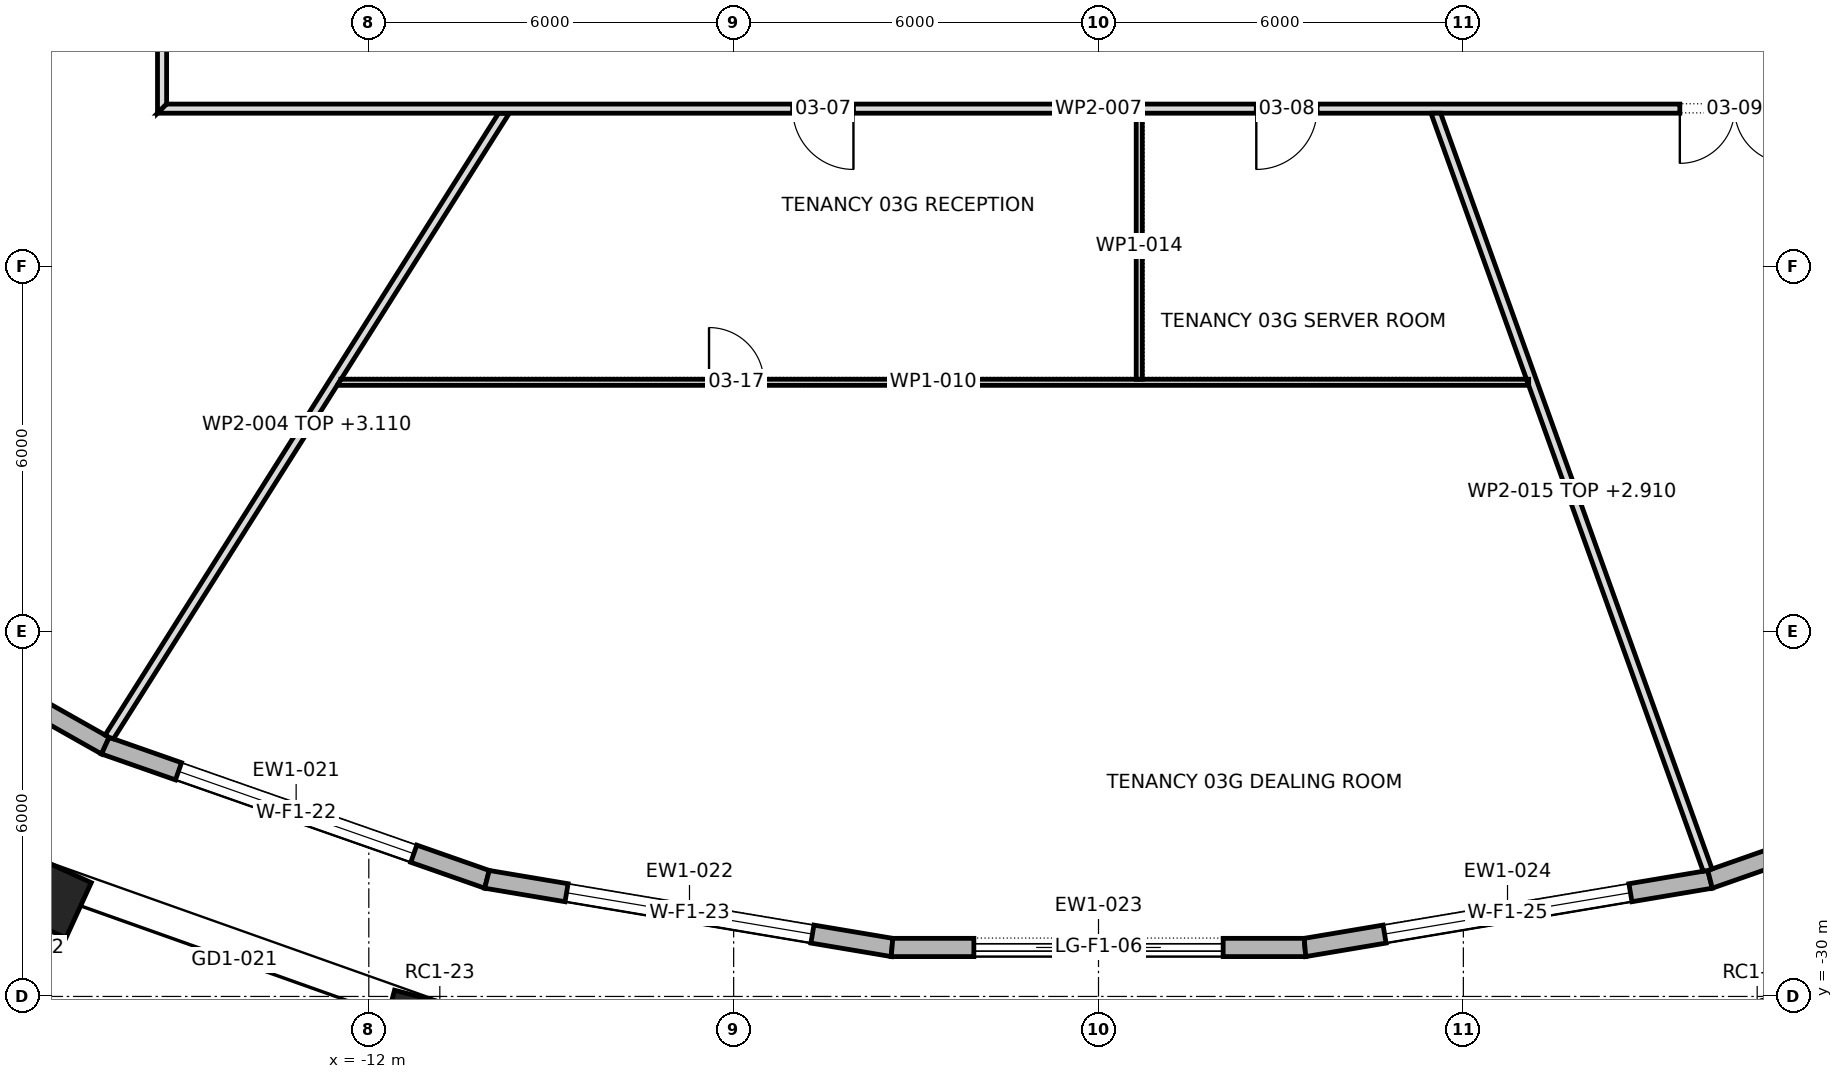
"""IFC4 building model, lengths in metres.
Left out: names, types, materials, properties, quantities, classifications, styles, units other than length and angle.
Written with IfcOpenShell. Run it as: python <this file> out.ifc"""

import sys

from ifc_helpers import new_model, si_unit, direction, frame, frame_2d, origin, origin_2d, place, context, subcontext, project, spatial, polyline, rectangle, outline, extrude, element, fill, save


model = new_model("IFC4")
c1 = context("Model", 3, precision=1e-05, world=origin(), true_north=direction((0.0, 1.0)))
c2 = subcontext(c1, "Body", "Model", "MODEL_VIEW")
j1 = project(units=[si_unit("LENGTHUNIT", "METRE"), si_unit("PLANEANGLEUNIT", "RADIAN")], contexts=[c1])
p1 = place(None, origin())
s1 = spatial("IfcSite", under=j1, at=p1, CompositionType="ELEMENT")
p2 = place(p1, origin())
s2 = spatial("IfcBuilding", under=s1, at=p2, CompositionType="ELEMENT")
p3 = place(p2, frame((0.0, 0.0, 48.7)))
s3 = spatial("IfcBuildingStorey", under=s2, at=p3, CompositionType="ELEMENT", Elevation=48.7)
for number, where, z_axis, x_axis in (
    (1, (-17.591, -28.208, 0.0), (0.0, 0.0, 1.0), (0.909, -0.417, 0.0)),
    (2, (-10.832, -30.608, 0.0), (0.0, 0.0, 1.0), (0.968, -0.252, 0.0)),
    (3, (10.832, -30.608, 0.0), (0.0, 0.0, 1.0), (0.968, 0.252, 0.0)),
):
    element("IfcColumn", number, at=place(p3, frame(where, z_axis=z_axis, x_axis=x_axis)), inside=s3, PredefinedType="COLUMN", context=c2, shape_type="SweptSolid", body=[
        extrude(rectangle(XDim=1.8, YDim=1.0, at=origin_2d()), origin(), (0.0, 0.0, 1.0), 4.2),
    ])
p4 = place(p3, frame((-21.983, -22.684, 0.0), z_axis=(0.0, 0.0, 1.0), x_axis=(0.870647609977, -0.491907246584, 0.0)))
e4 = element("IfcWall", 4, at=p4, inside=s3, PredefinedType="STANDARD", context=c2, shape_type="SweptSolid", body=[
    extrude(outline(polyline([(-0.014, -0.15), (6.503, -0.15), (6.476, 0.15), (0.014, 0.15), (-0.014, -0.15)])), origin(), (0.0, 0.0, 1.0), 3.9),
])
p5 = place(p4, frame((1.195, 0.0, 0.6)))
e5 = element("IfcOpeningElement", 5, at=p5, cuts=e4, PredefinedType="OPENING", context=c2, shape_type="SweptSolid", body=[
    extrude(rectangle(XDim=4.1, YDim=2.85, at=frame_2d((2.05, 1.425))), frame((0.0, 0.162, 0.0), z_axis=(0.0, -1.0, 0.0), x_axis=(1.0, 0.0, 0.0)), (0.0, 0.0, 1.0), 0.324),
])
p6 = place(p3, frame((-16.333, -25.876, 0.0), z_axis=(0.0, 0.0, 1.0), x_axis=(0.943790794479, -0.330543395421, 0.0)))
e6 = element("IfcWall", 6, at=p6, inside=s3, PredefinedType="STANDARD", context=c2, shape_type="SweptSolid", body=[
    extrude(outline(polyline([(-0.013, -0.15), (6.662, -0.15), (6.637, 0.15), (0.013, 0.15), (-0.013, -0.15)])), origin(), (0.0, 0.0, 1.0), 3.9),
])
p7 = place(p6, frame((1.275, 0.0, 0.6)))
e7 = element("IfcOpeningElement", 7, at=p7, cuts=e6, PredefinedType="OPENING", context=c2, shape_type="SweptSolid", body=[
    extrude(rectangle(XDim=4.1, YDim=2.85, at=frame_2d((2.05, 1.425))), frame((0.0, 0.162, 0.0), z_axis=(0.0, -1.0, 0.0), x_axis=(1.0, 0.0, 0.0)), (0.0, 0.0, 1.0), 0.324),
])
p8 = place(p3, frame((-10.057, -28.074, 0.0), z_axis=(0.0, 0.0, 1.0), x_axis=(0.986149614624, -0.165858185139, 0.0)))
e8 = element("IfcWall", 8, at=p8, inside=s3, PredefinedType="STANDARD", context=c2, shape_type="SweptSolid", body=[
    extrude(outline(polyline([(-0.013, -0.15), (6.767, -0.15), (6.742, 0.15), (0.013, 0.15), (-0.013, -0.15)])), origin(), (0.0, 0.0, 1.0), 3.9),
])
p9 = place(p8, frame((1.327, 0.0, 0.6)))
e9 = element("IfcOpeningElement", 9, at=p9, cuts=e8, PredefinedType="OPENING", context=c2, shape_type="SweptSolid", body=[
    extrude(rectangle(XDim=4.1, YDim=2.85, at=frame_2d((2.05, 1.425))), frame((0.0, 0.162, 0.0), z_axis=(0.0, -1.0, 0.0), x_axis=(1.0, 0.0, 0.0)), (0.0, 0.0, 1.0), 0.324),
])
p10 = place(p3, frame((-3.396, -29.195, 0.0), z_axis=(0.0, 0.0, 1.0), x_axis=(1.0, 0.0, 0.0)))
e10 = element("IfcWall", 10, at=p10, inside=s3, PredefinedType="STANDARD", context=c2, shape_type="SweptSolid", body=[
    extrude(outline(polyline([(-0.012, -0.15), (6.803, -0.15), (6.779, 0.15), (0.012, 0.15), (-0.012, -0.15)])), origin(), (0.0, 0.0, 1.0), 3.9),
])
p11 = place(p10, frame((1.346, 0.0, 0.0)))
e11 = element("IfcOpeningElement", 11, at=p11, cuts=e10, PredefinedType="OPENING", context=c2, shape_type="SweptSolid", body=[
    extrude(rectangle(XDim=4.1, YDim=3.45, at=frame_2d((2.05, 1.725))), frame((0.0, 0.162, 0.0), z_axis=(0.0, -1.0, 0.0), x_axis=(1.0, 0.0, 0.0)), (0.0, 0.0, 1.0), 0.324),
])
p12 = place(p3, frame((3.396, -29.195, 0.0), z_axis=(0.0, 0.0, 1.0), x_axis=(0.986149614624, 0.165858185139, 0.0)))
e12 = element("IfcWall", 12, at=p12, inside=s3, PredefinedType="STANDARD", context=c2, shape_type="SweptSolid", body=[
    extrude(outline(polyline([(-0.012, -0.15), (6.768, -0.15), (6.742, 0.15), (0.012, 0.15), (-0.012, -0.15)])), origin(), (0.0, 0.0, 1.0), 3.9),
])
p13 = place(p12, frame((1.327, 0.0, 0.6)))
e13 = element("IfcOpeningElement", 13, at=p13, cuts=e12, PredefinedType="OPENING", context=c2, shape_type="SweptSolid", body=[
    extrude(rectangle(XDim=4.1, YDim=2.85, at=frame_2d((2.05, 1.425))), frame((0.0, 0.162, 0.0), z_axis=(0.0, -1.0, 0.0), x_axis=(1.0, 0.0, 0.0)), (0.0, 0.0, 1.0), 0.324),
])
p14 = place(p3, frame((10.057, -28.074, 0.0), z_axis=(0.0, 0.0, 1.0), x_axis=(0.943790794479, 0.330543395421, 0.0)))
e14 = element("IfcWall", 14, at=p14, inside=s3, PredefinedType="STANDARD", context=c2, shape_type="SweptSolid", body=[
    extrude(outline(polyline([(-0.013, -0.15), (6.663, -0.15), (6.636, 0.15), (0.013, 0.15), (-0.013, -0.15)])), origin(), (0.0, 0.0, 1.0), 3.9),
])
p15 = place(p14, frame((1.275, 0.0, 0.6)))
e15 = element("IfcOpeningElement", 15, at=p15, cuts=e14, PredefinedType="OPENING", context=c2, shape_type="SweptSolid", body=[
    extrude(rectangle(XDim=4.1, YDim=2.85, at=frame_2d((2.05, 1.425))), frame((0.0, 0.162, 0.0), z_axis=(0.0, -1.0, 0.0), x_axis=(1.0, 0.0, 0.0)), (0.0, 0.0, 1.0), 0.324),
])
p16 = place(p3, frame((-16.273, -25.742, 0.0), z_axis=(0.0, 0.0, 1.0), x_axis=(0.534654841392, 0.845070529942, 0.0)))
e16 = element("IfcWall", 16, at=p16, inside=s3, PredefinedType="PARTITIONING", context=c2, shape_type="SweptSolid", body=[
    extrude(outline(polyline([(0.021, -0.075), (1.769, -0.075), (3.517, -0.075), (5.265, -0.075), (7.013, -0.075), (7.018, -0.072), (7.019, -0.075), (8.745, -0.075), (10.471, -0.075), (12.196, -0.075), (12.196, -0.075), (12.102, 0.075), (10.373, 0.075), (8.644, 0.075), (6.915, 0.075), (5.186, 0.075), (3.458, 0.075), (1.729, 0.075), (0.0, 0.075), (0.0, 0.071), (0.004, -0.0), (0.021, -0.075)])), origin(), (0.0, 0.0, 1.0), 3.11),
])
p17 = place(p3, frame((-15.4, -15.475, 0.0), z_axis=(0.0, 0.0, 1.0), x_axis=(0.0, 1.0, 0.0)))
e17 = element("IfcWall", 17, at=p17, inside=s3, PredefinedType="PARTITIONING", context=c2, shape_type="SweptSolid", body=[
    extrude(outline(polyline([(0.15, -0.075), (2.066, -0.075), (3.981, -0.075), (5.897, -0.075), (7.812, -0.075), (9.728, -0.075), (11.644, -0.075), (13.56, -0.075), (15.475, -0.075), (17.391, -0.075), (19.306, -0.075), (21.222, -0.075), (23.138, -0.075), (25.053, -0.075), (26.969, -0.075), (28.885, -0.075), (30.8, -0.075), (30.95, 0.075), (29.016, 0.075), (27.081, 0.075), (25.147, 0.075), (23.212, 0.075), (21.278, 0.075), (19.344, 0.075), (17.409, 0.075), (15.475, 0.075), (13.541, 0.075), (11.606, 0.075), (9.672, 0.075), (7.738, 0.075), (5.803, 0.075), (3.869, 0.075), (1.935, 0.075), (0.0, 0.075), (0.15, -0.075)])), origin(), (0.0, 0.0, 1.0), 3.9),
])
p18 = place(p17, frame((25.755, 0.0, 0.0)))
e18 = element("IfcOpeningElement", 18, at=p18, cuts=e17, PredefinedType="OPENING", context=c2, shape_type="SweptSolid", body=[
    extrude(rectangle(XDim=1.8, YDim=2.1, at=frame_2d((0.9, 1.05))), frame((0.0, 0.087, 0.0), z_axis=(0.0, -1.0, 0.0), x_axis=(1.0, 0.0, 0.0)), (0.0, 0.0, 1.0), 0.174),
])
p19 = place(p17, frame((18.695, 0.0, 0.0)))
e19 = element("IfcOpeningElement", 19, at=p19, cuts=e17, PredefinedType="OPENING", context=c2, shape_type="SweptSolid", body=[
    extrude(rectangle(XDim=1.8, YDim=2.1, at=frame_2d((0.9, 1.05))), frame((0.0, 0.087, 0.0), z_axis=(0.0, -1.0, 0.0), x_axis=(1.0, 0.0, 0.0)), (0.0, 0.0, 1.0), 0.174),
])
p20 = place(p17, frame((12.135, 0.0, 0.0)))
e20 = element("IfcOpeningElement", 20, at=p20, cuts=e17, PredefinedType="OPENING", context=c2, shape_type="SweptSolid", body=[
    extrude(rectangle(XDim=1.0, YDim=2.1, at=frame_2d((0.5, 1.05))), frame((0.0, 0.087, 0.0), z_axis=(0.0, -1.0, 0.0), x_axis=(1.0, 0.0, 0.0)), (0.0, 0.0, 1.0), 0.174),
])
p21 = place(p17, frame((3.395, 0.0, 0.0)))
e21 = element("IfcOpeningElement", 21, at=p21, cuts=e17, PredefinedType="OPENING", context=c2, shape_type="SweptSolid", body=[
    extrude(rectangle(XDim=1.8, YDim=2.1, at=frame_2d((0.9, 1.05))), frame((0.0, 0.087, 0.0), z_axis=(0.0, -1.0, 0.0), x_axis=(1.0, 0.0, 0.0)), (0.0, 0.0, 1.0), 0.174),
])
p22 = place(p3, frame((-15.475, -15.4, 0.0), z_axis=(0.0, 0.0, 1.0), x_axis=(1.0, 0.0, 0.0)))
e22 = element("IfcWall", 22, at=p22, inside=s3, PredefinedType="PARTITIONING", context=c2, shape_type="SweptSolid", body=[
    extrude(outline(polyline([(0.0, -0.075), (1.935, -0.075), (3.869, -0.075), (5.803, -0.075), (7.738, -0.075), (9.672, -0.075), (11.606, -0.075), (13.541, -0.075), (15.475, -0.075), (17.409, -0.075), (19.344, -0.075), (21.278, -0.075), (23.212, -0.075), (25.147, -0.075), (27.081, -0.075), (29.016, -0.075), (30.95, -0.075), (30.8, 0.075), (28.885, 0.075), (26.969, 0.075), (25.053, 0.075), (23.138, 0.075), (21.222, 0.075), (19.306, 0.075), (17.391, 0.075), (15.475, 0.075), (13.56, 0.075), (11.644, 0.075), (9.728, 0.075), (7.812, 0.075), (5.897, 0.075), (3.981, 0.075), (2.066, 0.075), (0.15, 0.075), (0.0, -0.075)])), origin(), (0.0, 0.0, 1.0), 3.9),
])
p23 = place(p22, frame((10.445, 0.0, 0.0)))
e23 = element("IfcOpeningElement", 23, at=p23, cuts=e22, PredefinedType="OPENING", context=c2, shape_type="SweptSolid", body=[
    extrude(rectangle(XDim=1.0, YDim=2.1, at=frame_2d((0.5, 1.05))), frame((0.0, 0.087, 0.0), z_axis=(0.0, -1.0, 0.0), x_axis=(1.0, 0.0, 0.0)), (0.0, 0.0, 1.0), 0.174),
])
p24 = place(p22, frame((18.07, 0.0, 0.0)))
e24 = element("IfcOpeningElement", 24, at=p24, cuts=e22, PredefinedType="OPENING", context=c2, shape_type="SweptSolid", body=[
    extrude(rectangle(XDim=1.0, YDim=2.1, at=frame_2d((0.5, 1.05))), frame((0.0, 0.087, 0.0), z_axis=(0.0, -1.0, 0.0), x_axis=(1.0, 0.0, 0.0)), (0.0, 0.0, 1.0), 0.174),
])
p25 = place(p22, frame((25.035, 0.0, 0.0)))
e25 = element("IfcOpeningElement", 25, at=p25, cuts=e22, PredefinedType="OPENING", context=c2, shape_type="SweptSolid", body=[
    extrude(rectangle(XDim=1.8, YDim=2.1, at=frame_2d((0.9, 1.05))), frame((0.0, 0.087, 0.0), z_axis=(0.0, -1.0, 0.0), x_axis=(1.0, 0.0, 0.0)), (0.0, 0.0, 1.0), 0.174),
])
p26 = place(p3, frame((-12.52, -19.9, 0.0), z_axis=(0.0, 0.0, 1.0), x_axis=(1.0, 0.0, 0.0)))
e26 = element("IfcWall", 26, at=p26, inside=s3, PredefinedType="PARTITIONING", context=c2, shape_type="SweptSolid", body=[
    extrude(outline(polyline([(19.594, -0.05), (19.594, -0.049), (19.558, 0.05), (17.978, 0.05), (16.399, 0.05), (14.819, 0.05), (13.24, 0.05), (13.24, 0.05), (13.14, 0.05), (13.14, 0.05), (11.271, 0.05), (9.403, 0.05), (7.535, 0.05), (5.667, 0.05), (3.799, 0.05), (1.931, 0.05), (0.063, 0.05), (0.0, -0.05), (0.0, -0.05), (1.959, -0.05), (3.919, -0.05), (5.878, -0.05), (7.837, -0.05), (9.797, -0.05), (11.756, -0.05), (13.715, -0.05), (15.675, -0.05), (17.634, -0.05), (19.594, -0.05)])), origin(), (0.0, 0.0, 1.0), 3.9),
])
p27 = place(p26, frame((6.115, 0.0, 0.0)))
e27 = element("IfcOpeningElement", 27, at=p27, cuts=e26, PredefinedType="OPENING", context=c2, shape_type="SweptSolid", body=[
    extrude(rectangle(XDim=0.9, YDim=2.1, at=frame_2d((0.45, 1.05))), frame((0.0, 0.062, 0.0), z_axis=(0.0, -1.0, 0.0), x_axis=(1.0, 0.0, 0.0)), (0.0, 0.0, 1.0), 0.124),
])
p28 = place(p3, frame((0.67, -15.475, 0.0), z_axis=(0.0, 0.0, 1.0), x_axis=(0.0, -1.0, 0.0)))
e28 = element("IfcWall", 28, at=p28, inside=s3, PredefinedType="PARTITIONING", context=c2, shape_type="SweptSolid", body=[
    extrude(rectangle(XDim=4.375, YDim=0.1, at=frame_2d((2.188, 0.0))), origin(), (0.0, 0.0, 1.0), 3.9),
])
p29 = place(p3, frame((5.538, -15.45, 0.0), z_axis=(0.0, 0.0, 1.0), x_axis=(0.337991057854, -0.941149321208, 0.0)))
e29 = element("IfcWall", 29, at=p29, inside=s3, PredefinedType="PARTITIONING", context=c2, shape_type="SweptSolid", body=[
    extrude(outline(polyline([(0.0, -0.075), (1.549, -0.075), (3.099, -0.075), (4.648, -0.075), (4.66, -0.042), (4.754, -0.075), (6.452, -0.075), (8.15, -0.075), (9.849, -0.075), (11.547, -0.075), (13.245, -0.075), (13.259, 0.0), (13.259, 0.041), (13.259, 0.075), (11.373, 0.075), (9.486, 0.075), (7.6, 0.075), (5.713, 0.075), (3.826, 0.075), (1.94, 0.075), (0.053, 0.075), (0.0, -0.074), (0.0, -0.075)])), origin(), (0.0, 0.0, 1.0), 2.91),
])
p30 = place(p7, origin())
e30 = element("IfcWindow", 30, at=p30, inside=s3, PartitioningType="TRIPLE_PANEL_VERTICAL", PredefinedType="WINDOW", context=c2, shape_type="SweptSolid", body=[
    extrude(rectangle(XDim=4.1, YDim=2.85, at=frame_2d((2.05, 1.425))), frame((0.0, 0.03, 0.0), z_axis=(0.0, -1.0, 0.0), x_axis=(1.0, 0.0, 0.0)), (0.0, 0.0, 1.0), 0.06),
])
fill(e7, e30)
p31 = place(p9, origin())
e31 = element("IfcWindow", 31, at=p31, inside=s3, PartitioningType="TRIPLE_PANEL_VERTICAL", PredefinedType="WINDOW", context=c2, shape_type="SweptSolid", body=[
    extrude(rectangle(XDim=4.1, YDim=2.85, at=frame_2d((2.05, 1.425))), frame((0.0, 0.03, 0.0), z_axis=(0.0, -1.0, 0.0), x_axis=(1.0, 0.0, 0.0)), (0.0, 0.0, 1.0), 0.06),
])
fill(e9, e31)
p32 = place(p11, origin())
e32 = element("IfcDoor", 32, at=p32, inside=s3, OperationType="DOUBLE_DOOR_SLIDING", PredefinedType="DOOR", context=c2, shape_type="SweptSolid", body=[
    extrude(rectangle(XDim=4.1, YDim=3.45, at=frame_2d((2.05, 1.725))), frame((0.0, 0.025, 0.0), z_axis=(0.0, -1.0, 0.0), x_axis=(1.0, 0.0, 0.0)), (0.0, 0.0, 1.0), 0.05),
])
fill(e11, e32)
p33 = place(p13, origin())
e33 = element("IfcWindow", 33, at=p33, inside=s3, PartitioningType="TRIPLE_PANEL_VERTICAL", PredefinedType="WINDOW", context=c2, shape_type="SweptSolid", body=[
    extrude(rectangle(XDim=4.1, YDim=2.85, at=frame_2d((2.05, 1.425))), frame((0.0, 0.03, 0.0), z_axis=(0.0, -1.0, 0.0), x_axis=(1.0, 0.0, 0.0)), (0.0, 0.0, 1.0), 0.06),
])
fill(e13, e33)
p34 = place(p23, frame((1.0, 0.0, 0.0), z_axis=(0.0, 0.0, 1.0), x_axis=(-1.0, 0.0, 0.0)))
e34 = element("IfcDoor", 34, at=p34, inside=s3, OperationType="SINGLE_SWING_RIGHT", PredefinedType="DOOR", context=c2, shape_type="SweptSolid", body=[
    extrude(rectangle(XDim=1.0, YDim=2.1, at=frame_2d((0.5, 1.05))), frame((0.0, 0.025, 0.0), z_axis=(0.0, -1.0, 0.0), x_axis=(1.0, 0.0, 0.0)), (0.0, 0.0, 1.0), 0.05),
])
fill(e23, e34)
p35 = place(p24, frame((1.0, 0.0, 0.0), z_axis=(0.0, 0.0, 1.0), x_axis=(-1.0, 0.0, 0.0)))
e35 = element("IfcDoor", 35, at=p35, inside=s3, OperationType="SINGLE_SWING_LEFT", PredefinedType="DOOR", context=c2, shape_type="SweptSolid", body=[
    extrude(rectangle(XDim=1.0, YDim=2.1, at=frame_2d((0.5, 1.05))), frame((0.0, 0.025, 0.0), z_axis=(0.0, -1.0, 0.0), x_axis=(1.0, 0.0, 0.0)), (0.0, 0.0, 1.0), 0.05),
])
fill(e24, e35)
p36 = place(p25, frame((1.8, 0.0, 0.0), z_axis=(0.0, 0.0, 1.0), x_axis=(-1.0, 0.0, 0.0)))
e36 = element("IfcDoor", 36, at=p36, inside=s3, OperationType="DOUBLE_DOOR_SINGLE_SWING", PredefinedType="DOOR", context=c2, shape_type="SweptSolid", body=[
    extrude(rectangle(XDim=1.8, YDim=2.1, at=frame_2d((0.9, 1.05))), frame((0.0, 0.025, 0.0), z_axis=(0.0, -1.0, 0.0), x_axis=(1.0, 0.0, 0.0)), (0.0, 0.0, 1.0), 0.05),
])
fill(e25, e36)
p37 = place(p27, origin())
e37 = element("IfcDoor", 37, at=p37, inside=s3, OperationType="SINGLE_SWING_RIGHT", PredefinedType="DOOR", context=c2, shape_type="SweptSolid", body=[
    extrude(rectangle(XDim=0.9, YDim=2.1, at=frame_2d((0.45, 1.05))), frame((0.0, 0.025, 0.0), z_axis=(0.0, -1.0, 0.0), x_axis=(1.0, 0.0, 0.0)), (0.0, 0.0, 1.0), 0.05),
])
fill(e27, e37)
save(model, sys.argv[1])
